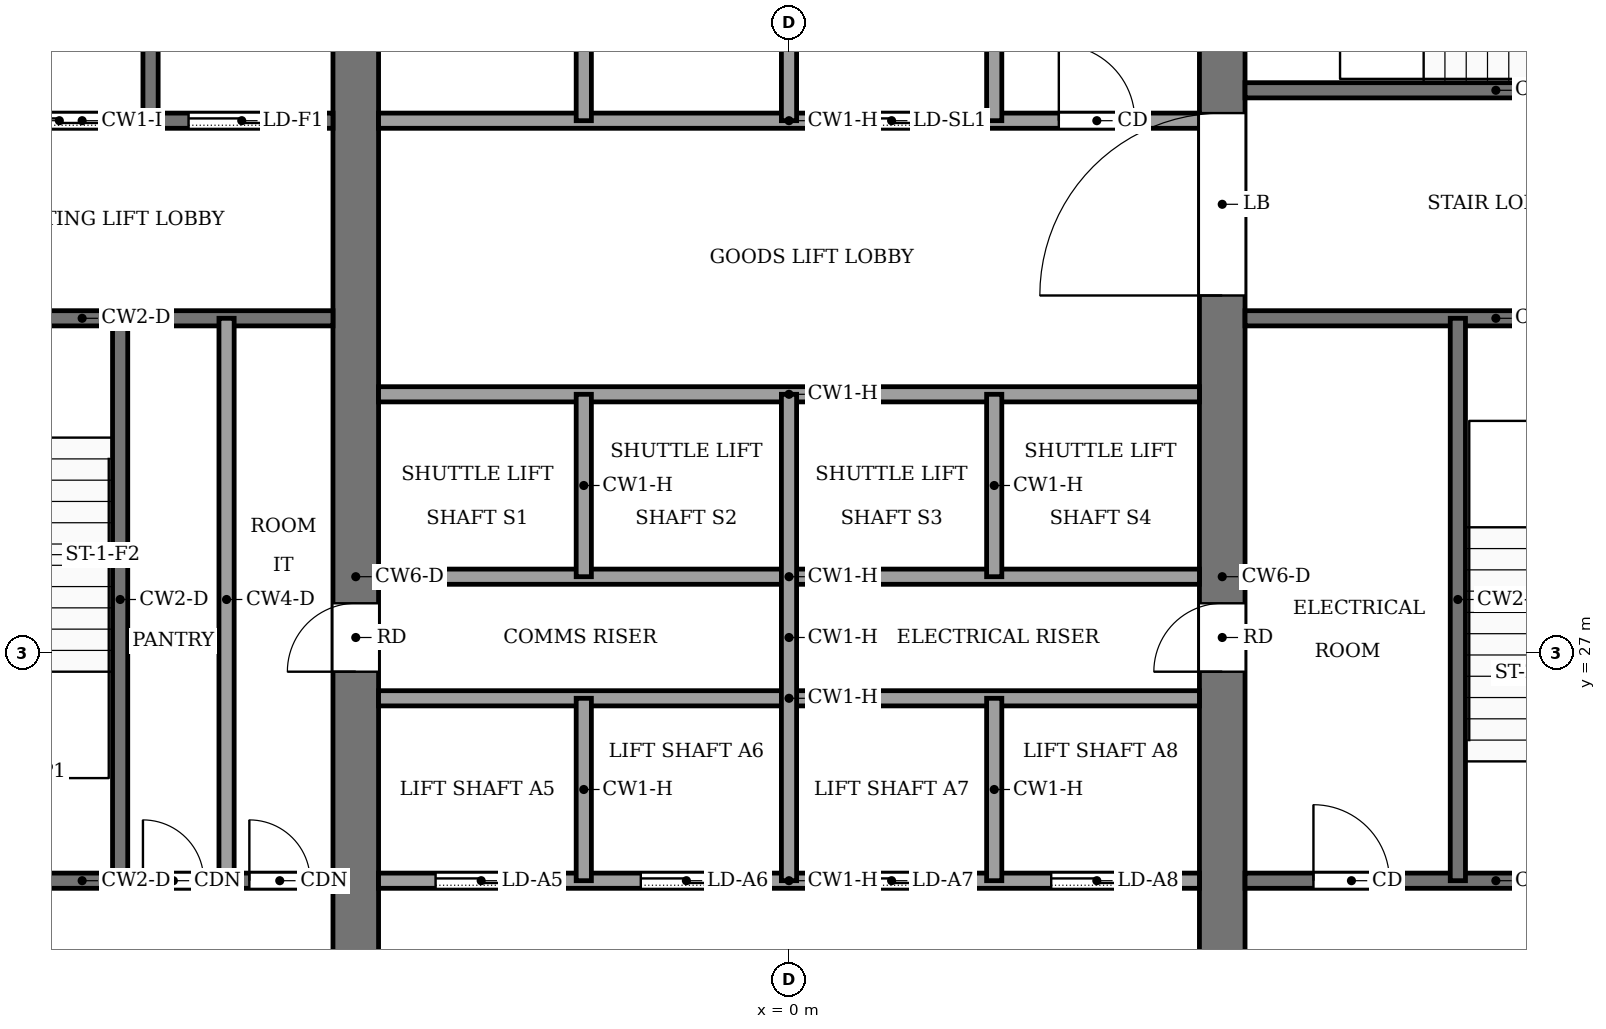
"""IFC4 building model, lengths in metres.
Left out: names, types, materials, properties, quantities, classifications, styles, units other than length and angle.
Written with IfcOpenShell. Run it as: python <this file> out.ifc"""

import sys

from ifc_helpers import new_model, si_unit, direction, frame, frame_2d, origin, place, context, subcontext, project, spatial, rectangle, extrude, element, fill, save


model = new_model("IFC4")
c1 = context("Model", 3, precision=1e-05, world=origin(), true_north=direction((0.0, 1.0)))
c2 = subcontext(c1, "Body", "Model", "MODEL_VIEW")
j1 = project(units=[si_unit("LENGTHUNIT", "METRE"), si_unit("PLANEANGLEUNIT", "RADIAN")], contexts=[c1])
p1 = place(None, origin())
s1 = spatial("IfcSite", under=j1, at=p1, CompositionType="ELEMENT")
p2 = place(p1, origin())
s2 = spatial("IfcBuilding", under=s1, at=p2, CompositionType="ELEMENT")
p3 = place(p2, frame((0.0, 0.0, 166.0)))
s3 = spatial("IfcBuildingStorey", under=s2, at=p3, CompositionType="ELEMENT", Elevation=166.0)
p4 = place(p3, frame((-5.7, 18.4, -0.13), z_axis=(0.0, 0.0, 1.0), x_axis=(0.0, 1.0, 0.0)))
e1 = element("IfcWall", 1, at=p4, inside=s3, PredefinedType="SHEAR", context=c2, shape_type="SweptSolid", body=[
    extrude(rectangle(XDim=19.2, YDim=0.6, at=frame_2d((9.6, 0.0))), origin(), (0.0, 0.0, 1.0), 3.88),
])
p5 = place(p4, frame((8.35, 0.0, 0.13)))
e2 = element("IfcOpeningElement", 2, at=p5, cuts=e1, PredefinedType="OPENING", context=c2, shape_type="SweptSolid", body=[
    extrude(rectangle(XDim=0.9, YDim=2.1, at=frame_2d((0.45, 1.05))), frame((0.0, 0.31, 0.0), z_axis=(0.0, -1.0, 0.0), x_axis=(1.0, 0.0, 0.0)), (0.0, 0.0, 1.0), 0.62),
])
p6 = place(p3, frame((5.7, 18.4, -0.13), z_axis=(0.0, 0.0, 1.0), x_axis=(0.0, 1.0, 0.0)))
e3 = element("IfcWall", 3, at=p6, inside=s3, PredefinedType="SHEAR", context=c2, shape_type="SweptSolid", body=[
    extrude(rectangle(XDim=19.2, YDim=0.6, at=frame_2d((9.6, 0.0))), origin(), (0.0, 0.0, 1.0), 3.88),
])
p7 = place(p6, frame((8.35, 0.0, 0.13)))
e4 = element("IfcOpeningElement", 4, at=p7, cuts=e3, PredefinedType="OPENING", context=c2, shape_type="SweptSolid", body=[
    extrude(rectangle(XDim=0.9, YDim=2.1, at=frame_2d((0.45, 1.05))), frame((0.0, 0.31, 0.0), z_axis=(0.0, -1.0, 0.0), x_axis=(1.0, 0.0, 0.0)), (0.0, 0.0, 1.0), 0.62),
])
p8 = place(p6, frame((13.3, 0.0, 0.13)))
e5 = element("IfcOpeningElement", 5, at=p8, cuts=e3, PredefinedType="OPENING", context=c2, shape_type="SweptSolid", body=[
    extrude(rectangle(XDim=2.4, YDim=2.4, at=frame_2d((1.2, 1.2))), frame((0.0, 0.31, 0.0), z_axis=(0.0, -1.0, 0.0), x_axis=(1.0, 0.0, 0.0)), (0.0, 0.0, 1.0), 0.62),
])
p9 = place(p3, frame((-12.6, 24.0, 0.0), z_axis=(0.0, 0.0, 1.0), x_axis=(1.0, 0.0, 0.0)))
e6 = element("IfcWall", 6, at=p9, inside=s3, PredefinedType="PARTITIONING", context=c2, shape_type="SweptSolid", body=[
    extrude(rectangle(XDim=6.6, YDim=0.2, at=frame_2d((3.3, 0.0))), origin(), (0.0, 0.0, 1.0), 3.75),
])
p10 = place(p9, frame((4.1, 0.0, 0.0)))
e7 = element("IfcOpeningElement", 7, at=p10, cuts=e6, PredefinedType="OPENING", context=c2, shape_type="SweptSolid", body=[
    extrude(rectangle(XDim=0.8, YDim=2.1, at=frame_2d((0.4, 1.05))), frame((0.0, 0.11, 0.0), z_axis=(0.0, -1.0, 0.0), x_axis=(1.0, 0.0, 0.0)), (0.0, 0.0, 1.0), 0.22),
])
p11 = place(p9, frame((5.5, 0.0, 0.0)))
e8 = element("IfcOpeningElement", 8, at=p11, cuts=e6, PredefinedType="OPENING", context=c2, shape_type="SweptSolid", body=[
    extrude(rectangle(XDim=0.8, YDim=2.1, at=frame_2d((0.4, 1.05))), frame((0.0, 0.11, 0.0), z_axis=(0.0, -1.0, 0.0), x_axis=(1.0, 0.0, 0.0)), (0.0, 0.0, 1.0), 0.22),
])
p12 = place(p3, frame((-5.4, 24.0, 0.0), z_axis=(0.0, 0.0, 1.0), x_axis=(1.0, 0.0, 0.0)))
e9 = element("IfcWall", 9, at=p12, inside=s3, PredefinedType="PARTITIONING", context=c2, shape_type="SweptSolid", body=[
    extrude(rectangle(XDim=10.8, YDim=0.2, at=frame_2d((5.4, 0.0))), origin(), (0.0, 0.0, 1.0), 3.75),
])
p13 = place(p12, frame((0.75, 0.0, 0.0)))
e10 = element("IfcOpeningElement", 10, at=p13, cuts=e9, PredefinedType="OPENING", context=c2, shape_type="SweptSolid", body=[
    extrude(rectangle(XDim=1.2, YDim=2.2, at=frame_2d((0.6, 1.1))), frame((0.0, 0.11, 0.0), z_axis=(0.0, -1.0, 0.0), x_axis=(1.0, 0.0, 0.0)), (0.0, 0.0, 1.0), 0.22),
])
p14 = place(p12, frame((3.45, 0.0, 0.0)))
e11 = element("IfcOpeningElement", 11, at=p14, cuts=e9, PredefinedType="OPENING", context=c2, shape_type="SweptSolid", body=[
    extrude(rectangle(XDim=1.2, YDim=2.2, at=frame_2d((0.6, 1.1))), frame((0.0, 0.11, 0.0), z_axis=(0.0, -1.0, 0.0), x_axis=(1.0, 0.0, 0.0)), (0.0, 0.0, 1.0), 0.22),
])
p15 = place(p12, frame((6.15, 0.0, 0.0)))
e12 = element("IfcOpeningElement", 12, at=p15, cuts=e9, PredefinedType="OPENING", context=c2, shape_type="SweptSolid", body=[
    extrude(rectangle(XDim=1.2, YDim=2.2, at=frame_2d((0.6, 1.1))), frame((0.0, 0.11, 0.0), z_axis=(0.0, -1.0, 0.0), x_axis=(1.0, 0.0, 0.0)), (0.0, 0.0, 1.0), 0.22),
])
p16 = place(p12, frame((8.85, 0.0, 0.0)))
e13 = element("IfcOpeningElement", 13, at=p16, cuts=e9, PredefinedType="OPENING", context=c2, shape_type="SweptSolid", body=[
    extrude(rectangle(XDim=1.2, YDim=2.2, at=frame_2d((0.6, 1.1))), frame((0.0, 0.11, 0.0), z_axis=(0.0, -1.0, 0.0), x_axis=(1.0, 0.0, 0.0)), (0.0, 0.0, 1.0), 0.22),
])
p17 = place(p3, frame((6.0, 24.0, 0.0), z_axis=(0.0, 0.0, 1.0), x_axis=(1.0, 0.0, 0.0)))
e14 = element("IfcWall", 14, at=p17, inside=s3, PredefinedType="PARTITIONING", context=c2, shape_type="SweptSolid", body=[
    extrude(rectangle(XDim=6.6, YDim=0.2, at=frame_2d((3.3, 0.0))), origin(), (0.0, 0.0, 1.0), 3.75),
])
p18 = place(p17, frame((0.9, 0.0, 0.0)))
e15 = element("IfcOpeningElement", 15, at=p18, cuts=e14, PredefinedType="OPENING", context=c2, shape_type="SweptSolid", body=[
    extrude(rectangle(XDim=1.0, YDim=2.1, at=frame_2d((0.5, 1.05))), frame((0.0, 0.11, 0.0), z_axis=(0.0, -1.0, 0.0), x_axis=(1.0, 0.0, 0.0)), (0.0, 0.0, 1.0), 0.22),
])
p19 = place(p17, frame((4.4, 0.0, 0.0)))
e16 = element("IfcOpeningElement", 16, at=p19, cuts=e14, PredefinedType="OPENING", context=c2, shape_type="SweptSolid", body=[
    extrude(rectangle(XDim=1.2, YDim=2.2, at=frame_2d((0.6, 1.1))), frame((0.0, 0.11, 0.0), z_axis=(0.0, -1.0, 0.0), x_axis=(1.0, 0.0, 0.0)), (0.0, 0.0, 1.0), 0.22),
])
for number, where, z_axis, x_axis in (
    (17, (-5.4, 26.4, 0.0), (0.0, 0.0, 1.0), (1.0, 0.0, 0.0)),
    (18, (-5.4, 28.0, 0.0), (0.0, 0.0, 1.0), (1.0, 0.0, 0.0)),
    (19, (-5.4, 30.4, 0.0), (0.0, 0.0, 1.0), (1.0, 0.0, 0.0)),
):
    element("IfcWall", number, at=place(p3, frame(where, z_axis=z_axis, x_axis=x_axis)), inside=s3, PredefinedType="PARTITIONING", context=c2, shape_type="SweptSolid", body=[
        extrude(rectangle(XDim=10.8, YDim=0.2, at=frame_2d((5.4, 0.0))), origin(), (0.0, 0.0, 1.0), 3.75),
    ])
p20 = place(p3, frame((-12.6, 31.4, 0.0), z_axis=(0.0, 0.0, 1.0), x_axis=(1.0, 0.0, 0.0)))
e20 = element("IfcWall", 20, at=p20, inside=s3, PredefinedType="PARTITIONING", context=c2, shape_type="SweptSolid", body=[
    extrude(rectangle(XDim=6.6, YDim=0.2, at=frame_2d((3.3, 0.0))), origin(), (0.0, 0.0, 1.0), 3.75),
])
p21 = place(p20, frame((1.0, 0.0, 0.0)))
e21 = element("IfcOpeningElement", 21, at=p21, cuts=e20, PredefinedType="OPENING", context=c2, shape_type="SweptSolid", body=[
    extrude(rectangle(XDim=1.2, YDim=2.2, at=frame_2d((0.6, 1.1))), frame((0.0, 0.11, 0.0), z_axis=(0.0, -1.0, 0.0), x_axis=(1.0, 0.0, 0.0)), (0.0, 0.0, 1.0), 0.22),
])
p22 = place(p3, frame((6.0, 31.4, 0.0), z_axis=(0.0, 0.0, 1.0), x_axis=(1.0, 0.0, 0.0)))
e22 = element("IfcWall", 22, at=p22, inside=s3, PredefinedType="PARTITIONING", context=c2, shape_type="SweptSolid", body=[
    extrude(rectangle(XDim=6.6, YDim=0.2, at=frame_2d((3.3, 0.0))), origin(), (0.0, 0.0, 1.0), 3.75),
])
p23 = place(p3, frame((-12.6, 34.0, 0.0), z_axis=(0.0, 0.0, 1.0), x_axis=(1.0, 0.0, 0.0)))
e23 = element("IfcWall", 23, at=p23, inside=s3, PredefinedType="PARTITIONING", context=c2, shape_type="SweptSolid", body=[
    extrude(rectangle(XDim=6.6, YDim=0.2, at=frame_2d((3.3, 0.0))), origin(), (0.0, 0.0, 1.0), 3.75),
])
p24 = place(p23, frame((4.7, 0.0, 0.0)))
e24 = element("IfcOpeningElement", 24, at=p24, cuts=e23, PredefinedType="OPENING", context=c2, shape_type="SweptSolid", body=[
    extrude(rectangle(XDim=1.4, YDim=2.2, at=frame_2d((0.7, 1.1))), frame((0.0, 0.11, 0.0), z_axis=(0.0, -1.0, 0.0), x_axis=(1.0, 0.0, 0.0)), (0.0, 0.0, 1.0), 0.22),
])
p25 = place(p23, frame((2.3, 0.0, 0.0)))
e25 = element("IfcOpeningElement", 25, at=p25, cuts=e23, PredefinedType="OPENING", context=c2, shape_type="SweptSolid", body=[
    extrude(rectangle(XDim=1.4, YDim=2.2, at=frame_2d((0.7, 1.1))), frame((0.0, 0.11, 0.0), z_axis=(0.0, -1.0, 0.0), x_axis=(1.0, 0.0, 0.0)), (0.0, 0.0, 1.0), 0.22),
])
p26 = place(p23, frame((0.45, 0.0, 0.0)))
e26 = element("IfcOpeningElement", 26, at=p26, cuts=e23, PredefinedType="OPENING", context=c2, shape_type="SweptSolid", body=[
    extrude(rectangle(XDim=0.9, YDim=2.1, at=frame_2d((0.45, 1.05))), frame((0.0, 0.11, 0.0), z_axis=(0.0, -1.0, 0.0), x_axis=(1.0, 0.0, 0.0)), (0.0, 0.0, 1.0), 0.22),
])
p27 = place(p3, frame((-5.4, 34.0, 0.0), z_axis=(0.0, 0.0, 1.0), x_axis=(1.0, 0.0, 0.0)))
e27 = element("IfcWall", 27, at=p27, inside=s3, PredefinedType="PARTITIONING", context=c2, shape_type="SweptSolid", body=[
    extrude(rectangle(XDim=10.8, YDim=0.2, at=frame_2d((5.4, 0.0))), origin(), (0.0, 0.0, 1.0), 3.75),
])
p28 = place(p27, frame((6.15, 0.0, 0.0)))
e28 = element("IfcOpeningElement", 28, at=p28, cuts=e27, PredefinedType="OPENING", context=c2, shape_type="SweptSolid", body=[
    extrude(rectangle(XDim=1.2, YDim=2.2, at=frame_2d((0.6, 1.1))), frame((0.0, 0.11, 0.0), z_axis=(0.0, -1.0, 0.0), x_axis=(1.0, 0.0, 0.0)), (0.0, 0.0, 1.0), 0.22),
])
p29 = place(p27, frame((8.95, 0.0, 0.0)))
e29 = element("IfcOpeningElement", 29, at=p29, cuts=e27, PredefinedType="OPENING", context=c2, shape_type="SweptSolid", body=[
    extrude(rectangle(XDim=1.0, YDim=2.1, at=frame_2d((0.5, 1.05))), frame((0.0, 0.11, 0.0), z_axis=(0.0, -1.0, 0.0), x_axis=(1.0, 0.0, 0.0)), (0.0, 0.0, 1.0), 0.22),
])
p30 = place(p3, frame((6.0, 34.4, 0.0), z_axis=(0.0, 0.0, 1.0), x_axis=(1.0, 0.0, 0.0)))
e30 = element("IfcWall", 30, at=p30, inside=s3, PredefinedType="PARTITIONING", context=c2, shape_type="SweptSolid", body=[
    extrude(rectangle(XDim=6.6, YDim=0.2, at=frame_2d((3.3, 0.0))), origin(), (0.0, 0.0, 1.0), 3.75),
])
p31 = place(p30, frame((4.8, 0.0, 0.0)))
e31 = element("IfcOpeningElement", 31, at=p31, cuts=e30, PredefinedType="OPENING", context=c2, shape_type="SweptSolid", body=[
    extrude(rectangle(XDim=1.2, YDim=2.2, at=frame_2d((0.6, 1.1))), frame((0.0, 0.11, 0.0), z_axis=(0.0, -1.0, 0.0), x_axis=(1.0, 0.0, 0.0)), (0.0, 0.0, 1.0), 0.22),
])
p32 = place(p3, frame((-8.8, 24.0, 0.0), z_axis=(0.0, 0.0, 1.0), x_axis=(0.0, 1.0, 0.0)))
e32 = element("IfcWall", 32, at=p32, inside=s3, PredefinedType="PARTITIONING", context=c2, shape_type="SweptSolid", body=[
    extrude(rectangle(XDim=7.4, YDim=0.2, at=frame_2d((3.7, 0.0))), origin(), (0.0, 0.0, 1.0), 3.75),
])
p33 = place(p3, frame((-8.4, 34.0, 0.0), z_axis=(0.0, 0.0, 1.0), x_axis=(0.0, 1.0, 0.0)))
e33 = element("IfcWall", 33, at=p33, inside=s3, PredefinedType="PARTITIONING", context=c2, shape_type="SweptSolid", body=[
    extrude(rectangle(XDim=3.6, YDim=0.2, at=frame_2d((1.8, 0.0))), origin(), (0.0, 0.0, 1.0), 3.75),
])
p34 = place(p3, frame((-7.4, 24.0, 0.0), z_axis=(0.0, 0.0, 1.0), x_axis=(0.0, 1.0, 0.0)))
e34 = element("IfcWall", 34, at=p34, inside=s3, PredefinedType="PARTITIONING", context=c2, shape_type="SweptSolid", body=[
    extrude(rectangle(XDim=7.4, YDim=0.2, at=frame_2d((3.7, 0.0))), origin(), (0.0, 0.0, 1.0), 3.75),
])
for number, where, z_axis, x_axis in (
    (35, (-2.7, 24.0, 0.0), (0.0, 0.0, 1.0), (0.0, 1.0, 0.0)),
    (36, (-2.7, 28.0, 0.0), (0.0, 0.0, 1.0), (0.0, 1.0, 0.0)),
):
    element("IfcWall", number, at=place(p3, frame(where, z_axis=z_axis, x_axis=x_axis)), inside=s3, PredefinedType="PARTITIONING", context=c2, shape_type="SweptSolid", body=[
        extrude(rectangle(XDim=2.4, YDim=0.2, at=frame_2d((1.2, 0.0))), origin(), (0.0, 0.0, 1.0), 3.75),
    ])
p35 = place(p3, frame((-2.7, 34.0, 0.0), z_axis=(0.0, 0.0, 1.0), x_axis=(0.0, 1.0, 0.0)))
e37 = element("IfcWall", 37, at=p35, inside=s3, PredefinedType="PARTITIONING", context=c2, shape_type="SweptSolid", body=[
    extrude(rectangle(XDim=3.6, YDim=0.2, at=frame_2d((1.8, 0.0))), origin(), (0.0, 0.0, 1.0), 3.75),
])
p36 = place(p3, frame((0.0, 24.0, 0.0), z_axis=(0.0, 0.0, 1.0), x_axis=(0.0, 1.0, 0.0)))
e38 = element("IfcWall", 38, at=p36, inside=s3, PredefinedType="PARTITIONING", context=c2, shape_type="SweptSolid", body=[
    extrude(rectangle(XDim=6.4, YDim=0.2, at=frame_2d((3.2, 0.0))), origin(), (0.0, 0.0, 1.0), 3.75),
])
p37 = place(p3, frame((0.0, 34.0, 0.0), z_axis=(0.0, 0.0, 1.0), x_axis=(0.0, 1.0, 0.0)))
e39 = element("IfcWall", 39, at=p37, inside=s3, PredefinedType="PARTITIONING", context=c2, shape_type="SweptSolid", body=[
    extrude(rectangle(XDim=3.6, YDim=0.2, at=frame_2d((1.8, 0.0))), origin(), (0.0, 0.0, 1.0), 3.75),
])
for number, where, z_axis, x_axis in (
    (40, (2.7, 24.0, 0.0), (0.0, 0.0, 1.0), (0.0, 1.0, 0.0)),
    (41, (2.7, 28.0, 0.0), (0.0, 0.0, 1.0), (0.0, 1.0, 0.0)),
):
    element("IfcWall", number, at=place(p3, frame(where, z_axis=z_axis, x_axis=x_axis)), inside=s3, PredefinedType="PARTITIONING", context=c2, shape_type="SweptSolid", body=[
        extrude(rectangle(XDim=2.4, YDim=0.2, at=frame_2d((1.2, 0.0))), origin(), (0.0, 0.0, 1.0), 3.75),
    ])
p38 = place(p3, frame((2.7, 34.0, 0.0), z_axis=(0.0, 0.0, 1.0), x_axis=(0.0, 1.0, 0.0)))
e42 = element("IfcWall", 42, at=p38, inside=s3, PredefinedType="PARTITIONING", context=c2, shape_type="SweptSolid", body=[
    extrude(rectangle(XDim=3.6, YDim=0.2, at=frame_2d((1.8, 0.0))), origin(), (0.0, 0.0, 1.0), 3.75),
])
p39 = place(p3, frame((8.8, 24.0, 0.0), z_axis=(0.0, 0.0, 1.0), x_axis=(0.0, 1.0, 0.0)))
e43 = element("IfcWall", 43, at=p39, inside=s3, PredefinedType="PARTITIONING", context=c2, shape_type="SweptSolid", body=[
    extrude(rectangle(XDim=7.4, YDim=0.2, at=frame_2d((3.7, 0.0))), origin(), (0.0, 0.0, 1.0), 3.75),
])
p40 = place(p13, origin())
e44 = element("IfcDoor", 44, at=p40, inside=s3, OperationType="SLIDING_TO_LEFT", PredefinedType="DOOR", context=c2, shape_type="SweptSolid", body=[
    extrude(rectangle(XDim=1.2, YDim=2.2, at=frame_2d((0.6, 1.1))), frame((0.0, 0.025, 0.0), z_axis=(0.0, -1.0, 0.0), x_axis=(1.0, 0.0, 0.0)), (0.0, 0.0, 1.0), 0.05),
])
fill(e10, e44)
p41 = place(p14, origin())
e45 = element("IfcDoor", 45, at=p41, inside=s3, OperationType="SLIDING_TO_LEFT", PredefinedType="DOOR", context=c2, shape_type="SweptSolid", body=[
    extrude(rectangle(XDim=1.2, YDim=2.2, at=frame_2d((0.6, 1.1))), frame((0.0, 0.025, 0.0), z_axis=(0.0, -1.0, 0.0), x_axis=(1.0, 0.0, 0.0)), (0.0, 0.0, 1.0), 0.05),
])
fill(e11, e45)
p42 = place(p15, origin())
e46 = element("IfcDoor", 46, at=p42, inside=s3, OperationType="SLIDING_TO_LEFT", PredefinedType="DOOR", context=c2, shape_type="SweptSolid", body=[
    extrude(rectangle(XDim=1.2, YDim=2.2, at=frame_2d((0.6, 1.1))), frame((0.0, 0.025, 0.0), z_axis=(0.0, -1.0, 0.0), x_axis=(1.0, 0.0, 0.0)), (0.0, 0.0, 1.0), 0.05),
])
fill(e12, e46)
p43 = place(p16, origin())
e47 = element("IfcDoor", 47, at=p43, inside=s3, OperationType="SLIDING_TO_LEFT", PredefinedType="DOOR", context=c2, shape_type="SweptSolid", body=[
    extrude(rectangle(XDim=1.2, YDim=2.2, at=frame_2d((0.6, 1.1))), frame((0.0, 0.025, 0.0), z_axis=(0.0, -1.0, 0.0), x_axis=(1.0, 0.0, 0.0)), (0.0, 0.0, 1.0), 0.05),
])
fill(e13, e47)
p44 = place(p28, origin())
e48 = element("IfcDoor", 48, at=p44, inside=s3, OperationType="SLIDING_TO_LEFT", PredefinedType="DOOR", context=c2, shape_type="SweptSolid", body=[
    extrude(rectangle(XDim=1.2, YDim=2.2, at=frame_2d((0.6, 1.1))), frame((0.0, 0.025, 0.0), z_axis=(0.0, -1.0, 0.0), x_axis=(1.0, 0.0, 0.0)), (0.0, 0.0, 1.0), 0.05),
])
fill(e28, e48)
p45 = place(p24, origin())
e49 = element("IfcDoor", 49, at=p45, inside=s3, OperationType="SLIDING_TO_LEFT", PredefinedType="DOOR", context=c2, shape_type="SweptSolid", body=[
    extrude(rectangle(XDim=1.4, YDim=2.2, at=frame_2d((0.7, 1.1))), frame((0.0, 0.025, 0.0), z_axis=(0.0, -1.0, 0.0), x_axis=(1.0, 0.0, 0.0)), (0.0, 0.0, 1.0), 0.05),
])
fill(e24, e49)
p46 = place(p25, origin())
e50 = element("IfcDoor", 50, at=p46, inside=s3, OperationType="SLIDING_TO_LEFT", PredefinedType="DOOR", context=c2, shape_type="SweptSolid", body=[
    extrude(rectangle(XDim=1.4, YDim=2.2, at=frame_2d((0.7, 1.1))), frame((0.0, 0.025, 0.0), z_axis=(0.0, -1.0, 0.0), x_axis=(1.0, 0.0, 0.0)), (0.0, 0.0, 1.0), 0.05),
])
fill(e25, e50)
p47 = place(p10, origin())
e51 = element("IfcDoor", 51, at=p47, inside=s3, OperationType="SINGLE_SWING_LEFT", PredefinedType="DOOR", context=c2, shape_type="SweptSolid", body=[
    extrude(rectangle(XDim=0.8, YDim=2.1, at=frame_2d((0.4, 1.05))), frame((0.0, 0.025, 0.0), z_axis=(0.0, -1.0, 0.0), x_axis=(1.0, 0.0, 0.0)), (0.0, 0.0, 1.0), 0.05),
])
fill(e7, e51)
p48 = place(p11, origin())
e52 = element("IfcDoor", 52, at=p48, inside=s3, OperationType="SINGLE_SWING_RIGHT", PredefinedType="DOOR", context=c2, shape_type="SweptSolid", body=[
    extrude(rectangle(XDim=0.8, YDim=2.1, at=frame_2d((0.4, 1.05))), frame((0.0, 0.025, 0.0), z_axis=(0.0, -1.0, 0.0), x_axis=(1.0, 0.0, 0.0)), (0.0, 0.0, 1.0), 0.05),
])
fill(e8, e52)
p49 = place(p18, origin())
e53 = element("IfcDoor", 53, at=p49, inside=s3, OperationType="SINGLE_SWING_RIGHT", PredefinedType="DOOR", context=c2, shape_type="SweptSolid", body=[
    extrude(rectangle(XDim=1.0, YDim=2.1, at=frame_2d((0.5, 1.05))), frame((0.0, 0.025, 0.0), z_axis=(0.0, -1.0, 0.0), x_axis=(1.0, 0.0, 0.0)), (0.0, 0.0, 1.0), 0.05),
])
fill(e15, e53)
p50 = place(p29, origin())
e54 = element("IfcDoor", 54, at=p50, inside=s3, OperationType="SINGLE_SWING_LEFT", PredefinedType="DOOR", context=c2, shape_type="SweptSolid", body=[
    extrude(rectangle(XDim=1.0, YDim=2.1, at=frame_2d((0.5, 1.05))), frame((0.0, 0.025, 0.0), z_axis=(0.0, -1.0, 0.0), x_axis=(1.0, 0.0, 0.0)), (0.0, 0.0, 1.0), 0.05),
])
fill(e29, e54)
p51 = place(p5, origin())
e55 = element("IfcDoor", 55, at=p51, inside=s3, OperationType="SINGLE_SWING_LEFT", PredefinedType="DOOR", context=c2, shape_type="SweptSolid", body=[
    extrude(rectangle(XDim=0.9, YDim=2.1, at=frame_2d((0.45, 1.05))), frame((0.0, 0.025, 0.0), z_axis=(0.0, -1.0, 0.0), x_axis=(1.0, 0.0, 0.0)), (0.0, 0.0, 1.0), 0.05),
])
fill(e2, e55)
p52 = place(p7, origin())
e56 = element("IfcDoor", 56, at=p52, inside=s3, OperationType="SINGLE_SWING_RIGHT", PredefinedType="DOOR", context=c2, shape_type="SweptSolid", body=[
    extrude(rectangle(XDim=0.9, YDim=2.1, at=frame_2d((0.45, 1.05))), frame((0.0, 0.025, 0.0), z_axis=(0.0, -1.0, 0.0), x_axis=(1.0, 0.0, 0.0)), (0.0, 0.0, 1.0), 0.05),
])
fill(e4, e56)
p53 = place(p8, origin())
e57 = element("IfcDoor", 57, at=p53, inside=s3, OperationType="DOUBLE_DOOR_SINGLE_SWING", PredefinedType="DOOR", context=c2, shape_type="SweptSolid", body=[
    extrude(rectangle(XDim=2.4, YDim=2.4, at=frame_2d((1.2, 1.2))), frame((0.0, 0.025, 0.0), z_axis=(0.0, -1.0, 0.0), x_axis=(1.0, 0.0, 0.0)), (0.0, 0.0, 1.0), 0.05),
])
fill(e5, e57)
save(model, sys.argv[1])
